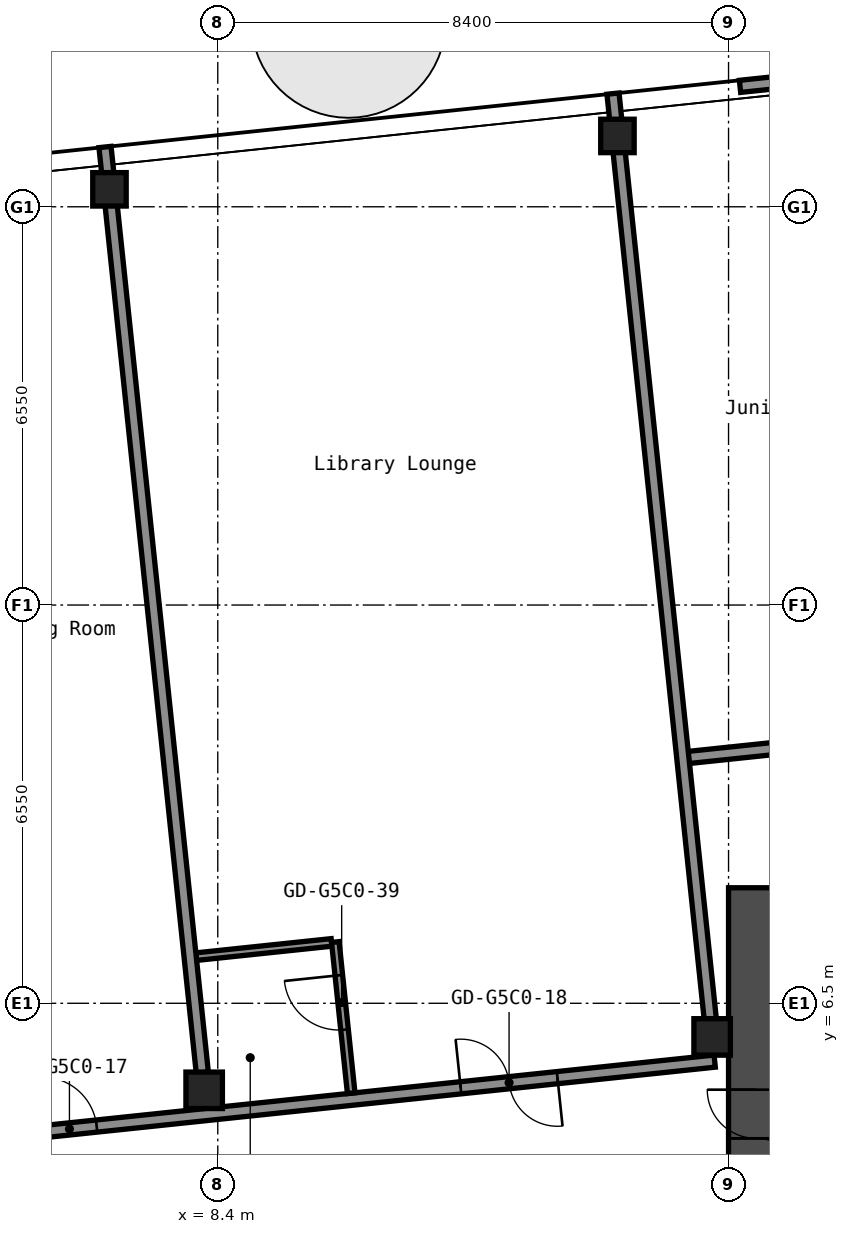
"""IFC4 building model, lengths in metres.
Left out: names, types, materials, properties, quantities, classifications, styles, units other than length and angle.
Written with IfcOpenShell. Run it as: python <this file> out.ifc"""

import sys

from ifc_helpers import new_model, si_unit, direction, frame, frame_2d, origin, origin_2d, place, context, subcontext, project, spatial, rectangle, hollow_rectangle, extrude, element, fill, save


model = new_model("IFC4")
c1 = context("Model", 3, precision=1e-05, world=origin(), true_north=direction((0.0, 1.0)))
c2 = subcontext(c1, "Body", "Model", "MODEL_VIEW")
j1 = project(units=[si_unit("LENGTHUNIT", "METRE"), si_unit("PLANEANGLEUNIT", "RADIAN")], contexts=[c1])
p1 = place(None, origin())
s1 = spatial("IfcSite", under=j1, at=p1, CompositionType="ELEMENT")
p2 = place(p1, origin())
s2 = spatial("IfcBuilding", under=s1, at=p2, CompositionType="ELEMENT")
p3 = place(p2, frame((0.0, 0.0, 245.4)))
s3 = spatial("IfcBuildingStorey", under=s2, at=p3, CompositionType="ELEMENT", Elevation=245.4)
p4 = place(p3, frame((8.176, 5.069, 0.0), z_axis=(0.0, 0.0, 1.0), x_axis=(1.0, 0.0, 0.0)))
e1 = element("IfcColumn", 1, at=p4, inside=s3, PredefinedType="COLUMN", context=c2, shape_type="SweptSolid", body=[
    extrude(hollow_rectangle(XDim=0.6, YDim=0.6, WallThickness=0.025, InnerFilletRadius=0.038, OuterFilletRadius=0.062, at=origin_2d()), origin(), (0.0, 0.0, 1.0), 2.75),
])
p5 = place(p3, frame((6.619, 19.887, 0.0), z_axis=(0.0, 0.0, 1.0), x_axis=(1.0, 0.0, 0.0)))
e2 = element("IfcColumn", 2, at=p5, inside=s3, PredefinedType="COLUMN", context=c2, shape_type="SweptSolid", body=[
    extrude(hollow_rectangle(XDim=0.55, YDim=0.55, WallThickness=0.022, InnerFilletRadius=0.033, OuterFilletRadius=0.055, at=origin_2d()), origin(), (0.0, 0.0, 1.0), 2.75),
])
p6 = place(p3, frame((16.53, 5.947, 0.0), z_axis=(0.0, 0.0, 1.0), x_axis=(1.0, 0.0, 0.0)))
e3 = element("IfcColumn", 3, at=p6, inside=s3, PredefinedType="COLUMN", context=c2, shape_type="SweptSolid", body=[
    extrude(hollow_rectangle(XDim=0.6, YDim=0.6, WallThickness=0.025, InnerFilletRadius=0.038, OuterFilletRadius=0.062, at=origin_2d()), origin(), (0.0, 0.0, 1.0), 2.75),
])
p7 = place(p3, frame((14.973, 20.765, 0.0), z_axis=(0.0, 0.0, 1.0), x_axis=(1.0, 0.0, 0.0)))
e4 = element("IfcColumn", 4, at=p7, inside=s3, PredefinedType="COLUMN", context=c2, shape_type="SweptSolid", body=[
    extrude(hollow_rectangle(XDim=0.55, YDim=0.55, WallThickness=0.022, InnerFilletRadius=0.033, OuterFilletRadius=0.055, at=origin_2d()), origin(), (0.0, 0.0, 1.0), 2.75),
])
p8 = place(p3, frame((17.25, -8.4, 0.0), z_axis=(0.0, 0.0, 1.0), x_axis=(0.0, 1.0, 0.0)))
e5 = element("IfcWall", 5, at=p8, inside=s3, PredefinedType="SHEAR", context=c2, shape_type="SweptSolid", body=[
    extrude(rectangle(XDim=16.8, YDim=0.9, at=frame_2d((8.4, 0.0))), origin(), (0.0, 0.0, 1.0), 2.75),
])
p9 = place(p8, frame((11.879, 0.0, 0.0)))
e6 = element("IfcOpeningElement", 6, at=p9, cuts=e5, PredefinedType="OPENING", context=c2, shape_type="SweptSolid", body=[
    extrude(rectangle(XDim=1.6, YDim=2.1, at=frame_2d((0.8, 1.05))), frame((0.0, 0.46, 0.0), z_axis=(0.0, -1.0, 0.0), x_axis=(1.0, 0.0, 0.0)), (0.0, 0.0, 1.0), 0.92),
])
p10 = place(p3, frame((-16.805, 2.041, 0.0), z_axis=(0.0, 0.0, 1.0), x_axis=(0.994521146831, 0.104535584879, 0.0)))
e7 = element("IfcWall", 7, at=p10, inside=s3, PredefinedType="PARTITIONING", context=c2, shape_type="SweptSolid", body=[
    extrude(rectangle(XDim=33.561, YDim=0.2, at=frame_2d((16.78, 0.0))), origin(), (0.0, 0.0, 1.0), 2.75),
])
p11 = place(p10, frame((4.161, 0.0, 0.0)))
e8 = element("IfcOpeningElement", 8, at=p11, cuts=e7, PredefinedType="OPENING", context=c2, shape_type="SweptSolid", body=[
    extrude(rectangle(XDim=1.6, YDim=2.1, at=frame_2d((0.8, 1.05))), frame((0.0, 0.11, 0.0), z_axis=(0.0, -1.0, 0.0), x_axis=(1.0, 0.0, 0.0)), (0.0, 0.0, 1.0), 0.22),
])
p12 = place(p10, frame((11.211, 0.0, 0.0)))
e9 = element("IfcOpeningElement", 9, at=p12, cuts=e7, PredefinedType="OPENING", context=c2, shape_type="SweptSolid", body=[
    extrude(rectangle(XDim=1.0, YDim=2.1, at=frame_2d((0.5, 1.05))), frame((0.0, 0.11, 0.0), z_axis=(0.0, -1.0, 0.0), x_axis=(1.0, 0.0, 0.0)), (0.0, 0.0, 1.0), 0.22),
])
p13 = place(p10, frame((12.911, 0.0, 0.0)))
e10 = element("IfcOpeningElement", 10, at=p13, cuts=e7, PredefinedType="OPENING", context=c2, shape_type="SweptSolid", body=[
    extrude(rectangle(XDim=1.0, YDim=2.1, at=frame_2d((0.5, 1.05))), frame((0.0, 0.11, 0.0), z_axis=(0.0, -1.0, 0.0), x_axis=(1.0, 0.0, 0.0)), (0.0, 0.0, 1.0), 0.22),
])
p14 = place(p10, frame((18.241, 0.0, 0.0)))
e11 = element("IfcOpeningElement", 11, at=p14, cuts=e7, PredefinedType="OPENING", context=c2, shape_type="SweptSolid", body=[
    extrude(rectangle(XDim=0.9, YDim=2.1, at=frame_2d((0.45, 1.05))), frame((0.0, 0.11, 0.0), z_axis=(0.0, -1.0, 0.0), x_axis=(1.0, 0.0, 0.0)), (0.0, 0.0, 1.0), 0.22),
])
p15 = place(p10, frame((22.441, 0.0, 0.0)))
e12 = element("IfcOpeningElement", 12, at=p15, cuts=e7, PredefinedType="OPENING", context=c2, shape_type="SweptSolid", body=[
    extrude(rectangle(XDim=0.9, YDim=2.1, at=frame_2d((0.45, 1.05))), frame((0.0, 0.11, 0.0), z_axis=(0.0, -1.0, 0.0), x_axis=(1.0, 0.0, 0.0)), (0.0, 0.0, 1.0), 0.22),
])
p16 = place(p10, frame((29.361, 0.0, 0.0)))
e13 = element("IfcOpeningElement", 13, at=p16, cuts=e7, PredefinedType="OPENING", context=c2, shape_type="SweptSolid", body=[
    extrude(rectangle(XDim=1.6, YDim=2.1, at=frame_2d((0.8, 1.05))), frame((0.0, 0.11, 0.0), z_axis=(0.0, -1.0, 0.0), x_axis=(1.0, 0.0, 0.0)), (0.0, 0.0, 1.0), 0.22),
])
p17 = place(p3, frame((8.046, 7.267, 0.0), z_axis=(0.0, 0.0, 1.0), x_axis=(0.99452218011, 0.104525754092, 0.0)))
e14 = element("IfcWall", 14, at=p17, inside=s3, PredefinedType="PARTITIONING", context=c2, shape_type="SweptSolid", body=[
    extrude(rectangle(XDim=2.238, YDim=0.125, at=frame_2d((1.119, 0.0))), origin(), (0.0, 0.0, 1.0), 2.75),
])
p18 = place(p3, frame((16.048, 10.533, 0.0), z_axis=(0.0, 0.0, 1.0), x_axis=(0.994522460242, 0.104523088709, 0.0)))
e15 = element("IfcWall", 15, at=p18, inside=s3, PredefinedType="PARTITIONING", context=c2, shape_type="SweptSolid", body=[
    extrude(rectangle(XDim=21.3, YDim=0.2, at=frame_2d((10.65, 0.0))), origin(), (0.0, 0.0, 1.0), 2.75),
])
p19 = place(p18, frame((2.0, 0.0, 0.0)))
e16 = element("IfcOpeningElement", 16, at=p19, cuts=e15, PredefinedType="OPENING", context=c2, shape_type="SweptSolid", body=[
    extrude(rectangle(XDim=1.0, YDim=2.1, at=frame_2d((0.5, 1.05))), frame((0.0, 0.11, 0.0), z_axis=(0.0, -1.0, 0.0), x_axis=(1.0, 0.0, 0.0)), (0.0, 0.0, 1.0), 0.22),
])
p20 = place(p18, frame((11.25, 0.0, 0.0)))
e17 = element("IfcOpeningElement", 17, at=p20, cuts=e15, PredefinedType="OPENING", context=c2, shape_type="SweptSolid", body=[
    extrude(rectangle(XDim=1.0, YDim=2.1, at=frame_2d((0.5, 1.05))), frame((0.0, 0.11, 0.0), z_axis=(0.0, -1.0, 0.0), x_axis=(1.0, 0.0, 0.0)), (0.0, 0.0, 1.0), 0.22),
])
p21 = place(p18, frame((12.95, 0.0, 0.0)))
e18 = element("IfcOpeningElement", 18, at=p21, cuts=e15, PredefinedType="OPENING", context=c2, shape_type="SweptSolid", body=[
    extrude(rectangle(XDim=1.0, YDim=2.1, at=frame_2d((0.5, 1.05))), frame((0.0, 0.11, 0.0), z_axis=(0.0, -1.0, 0.0), x_axis=(1.0, 0.0, 0.0)), (0.0, 0.0, 1.0), 0.22),
])
p22 = place(p18, frame((19.65, 0.0, 0.0)))
e19 = element("IfcOpeningElement", 19, at=p22, cuts=e15, PredefinedType="OPENING", context=c2, shape_type="SweptSolid", body=[
    extrude(rectangle(XDim=1.0, YDim=2.1, at=frame_2d((0.5, 1.05))), frame((0.0, 0.11, 0.0), z_axis=(0.0, -1.0, 0.0), x_axis=(1.0, 0.0, 0.0)), (0.0, 0.0, 1.0), 0.22),
])
p23 = place(p3, frame((8.146, 5.359, 0.0), z_axis=(0.0, 0.0, 1.0), x_axis=(-0.104523729364, 0.99452239291, 0.0)))
e20 = element("IfcWall", 20, at=p23, inside=s3, PredefinedType="PARTITIONING", context=c2, shape_type="SweptSolid", body=[
    extrude(rectangle(XDim=15.308, YDim=0.2, at=frame_2d((7.654, 0.0))), origin(), (0.0, 0.0, 1.0), 2.75),
])
p24 = place(p3, frame((10.594, 5.021, 0.0), z_axis=(0.0, 0.0, 1.0), x_axis=(-0.104491611519, 0.994525767953, 0.0)))
e21 = element("IfcWall", 21, at=p24, inside=s3, PredefinedType="PARTITIONING", context=c2, shape_type="SweptSolid", body=[
    extrude(rectangle(XDim=2.5, YDim=0.125, at=frame_2d((1.25, 0.0))), origin(), (0.0, 0.0, 1.0), 2.75),
])
p25 = place(p24, frame((1.05, 0.0, 0.0)))
e22 = element("IfcOpeningElement", 22, at=p25, cuts=e21, PredefinedType="OPENING", context=c2, shape_type="SweptSolid", body=[
    extrude(rectangle(XDim=0.9, YDim=2.1, at=frame_2d((0.45, 1.05))), frame((0.0, 0.073, 0.0), z_axis=(0.0, -1.0, 0.0), x_axis=(1.0, 0.0, 0.0)), (0.0, 0.0, 1.0), 0.145),
])
p26 = place(p3, frame((16.5, 6.237, 0.0), z_axis=(0.0, 0.0, 1.0), x_axis=(-0.104523729364, 0.99452239291, 0.0)))
e23 = element("IfcWall", 23, at=p26, inside=s3, PredefinedType="PARTITIONING", context=c2, shape_type="SweptSolid", body=[
    extrude(rectangle(XDim=15.308, YDim=0.2, at=frame_2d((7.654, 0.0))), origin(), (0.0, 0.0, 1.0), 2.75),
])
p27 = place(p9, origin())
e24 = element("IfcDoor", 24, at=p27, inside=s3, OperationType="DOUBLE_DOOR_SINGLE_SWING", PredefinedType="DOOR", context=c2, shape_type="SweptSolid", body=[
    extrude(rectangle(XDim=1.6, YDim=2.1, at=frame_2d((0.8, 1.05))), frame((0.0, 0.025, 0.0), z_axis=(0.0, -1.0, 0.0), x_axis=(1.0, 0.0, 0.0)), (0.0, 0.0, 1.0), 0.05),
])
fill(e6, e24)
p28 = place(p15, origin())
e25 = element("IfcDoor", 25, at=p28, inside=s3, OperationType="SINGLE_SWING_RIGHT", PredefinedType="DOOR", context=c2, shape_type="SweptSolid", body=[
    extrude(rectangle(XDim=0.9, YDim=2.1, at=frame_2d((0.45, 1.05))), frame((0.0, 0.025, 0.0), z_axis=(0.0, -1.0, 0.0), x_axis=(1.0, 0.0, 0.0)), (0.0, 0.0, 1.0), 0.05),
])
fill(e12, e25)
p29 = place(p16, origin())
e26 = element("IfcDoor", 26, at=p29, inside=s3, OperationType="DOUBLE_DOOR_SINGLE_SWING", PredefinedType="DOOR", context=c2, shape_type="SweptSolid", body=[
    extrude(rectangle(XDim=1.6, YDim=2.1, at=frame_2d((0.8, 1.05))), frame((0.0, 0.025, 0.0), z_axis=(0.0, -1.0, 0.0), x_axis=(1.0, 0.0, 0.0)), (0.0, 0.0, 1.0), 0.05),
])
fill(e13, e26)
p30 = place(p25, origin())
e27 = element("IfcDoor", 27, at=p30, inside=s3, OperationType="SINGLE_SWING_LEFT", PredefinedType="DOOR", context=c2, shape_type="SweptSolid", body=[
    extrude(rectangle(XDim=0.9, YDim=2.1, at=frame_2d((0.45, 1.05))), frame((0.0, 0.025, 0.0), z_axis=(0.0, -1.0, 0.0), x_axis=(1.0, 0.0, 0.0)), (0.0, 0.0, 1.0), 0.05),
])
fill(e22, e27)
save(model, sys.argv[1])
